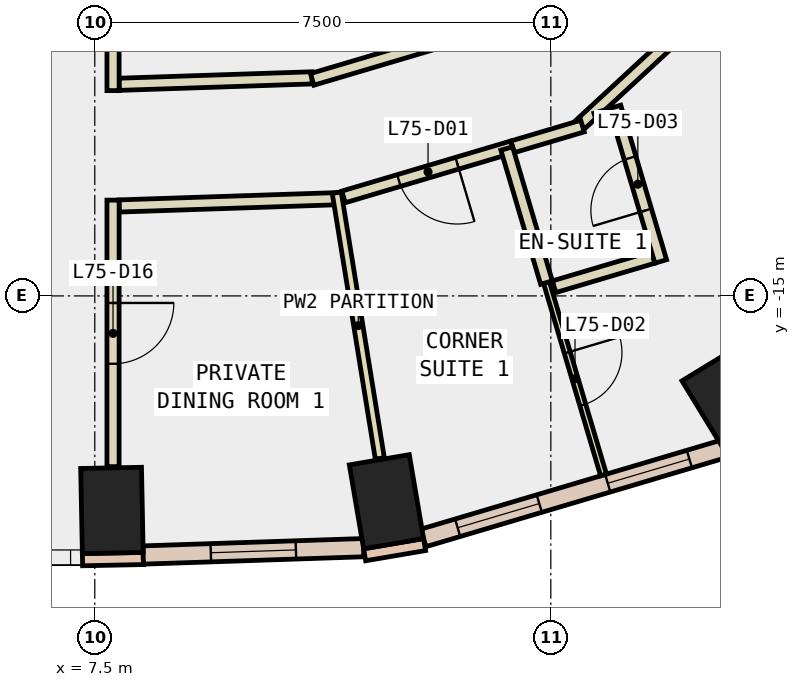
"""IFC4 building model, lengths in metres.
Left out: names, types, materials, properties, quantities, classifications, styles, units other than length and angle.
Written with IfcOpenShell. Run it as: python <this file> out.ifc"""

import sys

from ifc_helpers import new_model, si_unit, direction, frame, frame_2d, origin, origin_2d, place, context, subcontext, project, spatial, rectangle, extrude, element, fill, save


model = new_model("IFC4")
c1 = context("Model", 3, precision=1e-05, world=origin(), true_north=direction((0.0, 1.0)))
c2 = subcontext(c1, "Body", "Model", "MODEL_VIEW")
j1 = project(units=[si_unit("LENGTHUNIT", "METRE"), si_unit("PLANEANGLEUNIT", "RADIAN")], contexts=[c1])
p1 = place(None, origin())
s1 = spatial("IfcSite", under=j1, at=p1, CompositionType="ELEMENT")
p2 = place(p1, origin())
s2 = spatial("IfcBuilding", under=s1, at=p2, CompositionType="ELEMENT")
p3 = place(p2, frame((0.0, 0.0, 318.8)))
s3 = spatial("IfcBuildingStorey", under=s2, at=p3, CompositionType="ELEMENT", Elevation=318.8)
for number, where, z_axis, x_axis in (
    (1, (7.782, -18.528, -0.34), (0.0, 0.0, 1.0), (1.0, 0.02, 0.0)),
    (2, (12.297, -18.385, -0.34), (0.0, 0.0, 1.0), (0.986, 0.168, 0.0)),
    (3, (17.949, -16.734, -0.34), (0.0, 0.0, 1.0), (0.854, 0.521, 0.0)),
):
    element("IfcColumn", number, at=place(p3, frame(where, z_axis=z_axis, x_axis=x_axis)), inside=s3, PredefinedType="COLUMN", context=c2, shape_type="SweptSolid", body=[
        extrude(rectangle(XDim=1.0, YDim=1.4, at=origin_2d()), origin(), (0.0, 0.0, 1.0), 3.6),
    ])
for number, where, z_axis, x_axis in (
    (4, (7.298, -19.338, 0.0), (0.0, 0.0, 1.0), (1.0, 0.02, 0.0)),
    (5, (11.938, -19.257, 0.0), (0.0, 0.0, 1.0), (0.986, 0.168, 0.0)),
):
    element("IfcWall", number, at=place(p3, frame(where, z_axis=z_axis, x_axis=x_axis)), inside=s3, PredefinedType="STANDARD", context=c2, shape_type="SweptSolid", body=[
        extrude(rectangle(XDim=1.0, YDim=0.2, at=frame_2d((0.5, 0.0))), origin(), (0.0, 0.0, 1.0), 3.26),
    ])
p4 = place(p3, frame((8.296, -19.261, 0.0), z_axis=(0.0, 0.0, 1.0), x_axis=(0.999441913039, 0.033404527552, 0.0)))
e6 = element("IfcWall", 6, at=p4, inside=s3, PredefinedType="STANDARD", context=c2, shape_type="SweptSolid", body=[
    extrude(rectangle(XDim=3.625, YDim=0.3, at=frame_2d((1.812, 0.0))), origin(), (0.0, 0.0, 1.0), 3.26),
])
p5 = place(p4, frame((1.113, 0.0, 0.9)))
e7 = element("IfcOpeningElement", 7, at=p5, cuts=e6, PredefinedType="OPENING", context=c2, shape_type="SweptSolid", body=[
    extrude(rectangle(XDim=1.4, YDim=2.0, at=frame_2d((0.7, 1.0))), frame((0.0, 0.16, 0.0), z_axis=(0.0, -1.0, 0.0), x_axis=(1.0, 0.0, 0.0)), (0.0, 0.0, 1.0), 0.32),
])
p6 = place(p3, frame((12.904, -18.98, 0.0), z_axis=(0.0, 0.0, 1.0), x_axis=(0.958757933751, 0.284223898486, 0.0)))
e8 = element("IfcWall", 8, at=p6, inside=s3, PredefinedType="STANDARD", context=c2, shape_type="SweptSolid", body=[
    extrude(rectangle(XDim=5.15, YDim=0.3, at=frame_2d((2.575, 0.0))), origin(), (0.0, 0.0, 1.0), 3.26),
])
p7 = place(p6, frame((0.588, 0.0, 0.9)))
e9 = element("IfcOpeningElement", 9, at=p7, cuts=e8, PredefinedType="OPENING", context=c2, shape_type="SweptSolid", body=[
    extrude(rectangle(XDim=1.4, YDim=2.0, at=frame_2d((0.7, 1.0))), frame((0.0, 0.16, 0.0), z_axis=(0.0, -1.0, 0.0), x_axis=(1.0, 0.0, 0.0)), (0.0, 0.0, 1.0), 0.32),
])
p8 = place(p6, frame((3.163, 0.0, 0.9)))
e10 = element("IfcOpeningElement", 10, at=p8, cuts=e8, PredefinedType="OPENING", context=c2, shape_type="SweptSolid", body=[
    extrude(rectangle(XDim=1.4, YDim=2.0, at=frame_2d((0.7, 1.0))), frame((0.0, 0.16, 0.0), z_axis=(0.0, -1.0, 0.0), x_axis=(1.0, 0.0, 0.0)), (0.0, 0.0, 1.0), 0.32),
])
p9 = place(p3, frame((7.9, -11.52, 0.0), z_axis=(0.0, 0.0, 1.0), x_axis=(0.999442599499, 0.033383982774, 0.0)))
e11 = element("IfcWall", 11, at=p9, inside=s3, PredefinedType="PARTITIONING", context=c2, shape_type="SweptSolid", body=[
    extrude(rectangle(XDim=3.174, YDim=0.2, at=frame_2d((1.587, 0.0))), origin(), (0.0, 0.0, 1.0), 3.26),
])
p10 = place(p3, frame((11.076, -11.439, 0.0), z_axis=(0.0, 0.0, 1.0), x_axis=(0.958760241353, 0.284216114252, 0.0)))
e12 = element("IfcWall", 12, at=p10, inside=s3, PredefinedType="PARTITIONING", context=c2, shape_type="SweptSolid", body=[
    extrude(rectangle(XDim=3.578, YDim=0.2, at=frame_2d((1.789, 0.0))), origin(), (0.0, 0.0, 1.0), 3.26),
])
p11 = place(p3, frame((11.52, -13.4, 0.0), z_axis=(0.0, 0.0, 1.0), x_axis=(-0.999441010134, -0.033431530957, 0.0)))
e13 = element("IfcWall", 13, at=p11, inside=s3, PredefinedType="PARTITIONING", context=c2, shape_type="SweptSolid", body=[
    extrude(rectangle(XDim=3.622, YDim=0.2, at=frame_2d((1.811, 0.0))), origin(), (0.0, 0.0, 1.0), 3.26),
])
p12 = place(p3, frame((14.371, -12.548, 0.0), z_axis=(0.0, 0.0, 1.0), x_axis=(-0.958773475867, -0.284171465799, 0.0)))
e14 = element("IfcWall", 14, at=p12, inside=s3, PredefinedType="PARTITIONING", context=c2, shape_type="SweptSolid", body=[
    extrude(rectangle(XDim=2.9, YDim=0.2, at=frame_2d((1.45, 0.0))), origin(), (0.0, 0.0, 1.0), 3.26),
])
p13 = place(p12, frame((0.95, 0.0, 0.0)))
e15 = element("IfcOpeningElement", 15, at=p13, cuts=e14, PredefinedType="OPENING", context=c2, shape_type="SweptSolid", body=[
    extrude(rectangle(XDim=1.0, YDim=2.1, at=frame_2d((0.5, 1.05))), frame((0.0, 0.11, 0.0), z_axis=(0.0, -1.0, 0.0), x_axis=(1.0, 0.0, 0.0)), (0.0, 0.0, 1.0), 0.22),
])
p14 = place(p3, frame((17.718, -10.119, 0.0), z_axis=(0.0, 0.0, 1.0), x_axis=(-0.734673909713, -0.678420405344, 0.0)))
e16 = element("IfcWall", 16, at=p14, inside=s3, PredefinedType="PARTITIONING", context=c2, shape_type="SweptSolid", body=[
    extrude(rectangle(XDim=3.107, YDim=0.2, at=frame_2d((1.554, 0.0))), origin(), (0.0, 0.0, 1.0), 3.26),
])
p15 = place(p3, frame((15.521, -12.207, 0.0), z_axis=(0.0, 0.0, 1.0), x_axis=(-0.958717989575, -0.2843586054, 0.0)))
e17 = element("IfcWall", 17, at=p15, inside=s3, PredefinedType="PARTITIONING", context=c2, shape_type="SweptSolid", body=[
    extrude(rectangle(XDim=1.199, YDim=0.2, at=frame_2d((0.6, 0.0))), origin(), (0.0, 0.0, 1.0), 3.26),
])
p16 = place(p3, frame((7.8, -5.899, 0.0), z_axis=(0.0, 0.0, 1.0), x_axis=(0.0, -1.0, 0.0)))
e18 = element("IfcWall", 18, at=p16, inside=s3, PredefinedType="PARTITIONING", context=c2, shape_type="SweptSolid", body=[
    extrude(rectangle(XDim=5.725, YDim=0.2, at=frame_2d((2.863, 0.0))), origin(), (0.0, 0.0, 1.0), 3.26),
])
p17 = place(p3, frame((7.8, -13.425, 0.0), z_axis=(0.0, 0.0, 1.0), x_axis=(0.0, -1.0, 0.0)))
e19 = element("IfcWall", 19, at=p17, inside=s3, PredefinedType="PARTITIONING", context=c2, shape_type="SweptSolid", body=[
    extrude(rectangle(XDim=4.383, YDim=0.2, at=frame_2d((2.191, 0.0))), origin(), (0.0, 0.0, 1.0), 3.26),
])
p18 = place(p17, frame((1.691, 0.0, 0.0)))
e20 = element("IfcOpeningElement", 20, at=p18, cuts=e19, PredefinedType="OPENING", context=c2, shape_type="SweptSolid", body=[
    extrude(rectangle(XDim=1.0, YDim=2.1, at=frame_2d((0.5, 1.05))), frame((0.0, 0.11, 0.0), z_axis=(0.0, -1.0, 0.0), x_axis=(1.0, 0.0, 0.0)), (0.0, 0.0, 1.0), 0.22),
])
p19 = place(p3, frame((11.479, -13.302, 0.0), z_axis=(0.0, 0.0, 1.0), x_axis=(0.16010600403, -0.987099826499, 0.0)))
e21 = element("IfcWall", 21, at=p19, inside=s3, PredefinedType="PARTITIONING", context=c2, shape_type="SweptSolid", body=[
    extrude(rectangle(XDim=4.428, YDim=0.15, at=frame_2d((2.214, 0.0))), origin(), (0.0, 0.0, 1.0), 3.26),
])
p20 = place(p3, frame((14.929, -14.781, 0.0), z_axis=(0.0, 0.0, 1.0), x_axis=(0.284224342284, -0.958757802186, 0.0)))
e22 = element("IfcWall", 22, at=p20, inside=s3, PredefinedType="PARTITIONING", context=c2, shape_type="SweptSolid", body=[
    extrude(rectangle(XDim=3.3, YDim=0.1, at=frame_2d((1.65, 0.0))), origin(), (0.0, 0.0, 1.0), 3.26),
])
p21 = place(p20, frame((1.2, 0.0, 0.0)))
e23 = element("IfcOpeningElement", 23, at=p21, cuts=e22, PredefinedType="OPENING", context=c2, shape_type="SweptSolid", body=[
    extrude(rectangle(XDim=0.9, YDim=2.1, at=frame_2d((0.45, 1.05))), frame((0.0, 0.06, 0.0), z_axis=(0.0, -1.0, 0.0), x_axis=(1.0, 0.0, 0.0)), (0.0, 0.0, 1.0), 0.12),
])
p22 = place(p3, frame((14.275, -12.576, 0.0), z_axis=(0.0, 0.0, 1.0), x_axis=(0.284366601045, -0.958715618007, 0.0)))
e24 = element("IfcWall", 24, at=p22, inside=s3, PredefinedType="PARTITIONING", context=c2, shape_type="SweptSolid", body=[
    extrude(rectangle(XDim=2.3, YDim=0.2, at=frame_2d((1.15, 0.0))), origin(), (0.0, 0.0, 1.0), 3.26),
])
p23 = place(p3, frame((15.054, -14.849, 0.0), z_axis=(0.0, 0.0, 1.0), x_axis=(0.958727061754, 0.284328016666, 0.0)))
e25 = element("IfcWall", 25, at=p23, inside=s3, PredefinedType="PARTITIONING", context=c2, shape_type="SweptSolid", body=[
    extrude(rectangle(XDim=1.699, YDim=0.2, at=frame_2d((0.85, 0.0))), origin(), (0.0, 0.0, 1.0), 3.26),
])
p24 = place(p3, frame((16.808, -14.433, 0.0), z_axis=(0.0, 0.0, 1.0), x_axis=(-0.284524220245, 0.958668852156, 0.0)))
e26 = element("IfcWall", 26, at=p24, inside=s3, PredefinedType="PARTITIONING", context=c2, shape_type="SweptSolid", body=[
    extrude(rectangle(XDim=2.651, YDim=0.2, at=frame_2d((1.325, 0.0))), origin(), (0.0, 0.0, 1.0), 3.26),
])
p25 = place(p24, frame((0.875, 0.0, 0.0)))
e27 = element("IfcOpeningElement", 27, at=p25, cuts=e26, PredefinedType="OPENING", context=c2, shape_type="SweptSolid", body=[
    extrude(rectangle(XDim=0.9, YDim=2.1, at=frame_2d((0.45, 1.05))), frame((0.0, 0.11, 0.0), z_axis=(0.0, -1.0, 0.0), x_axis=(1.0, 0.0, 0.0)), (0.0, 0.0, 1.0), 0.22),
])
p26 = place(p3, frame((15.987, -12.017, 0.0), z_axis=(0.0, 0.0, 1.0), x_axis=(-0.958598776535, -0.284760224794, 0.0)))
e28 = element("IfcWall", 28, at=p26, inside=s3, PredefinedType="PARTITIONING", context=c2, shape_type="SweptSolid", body=[
    extrude(rectangle(XDim=0.26, YDim=0.2, at=frame_2d((0.13, 0.0))), origin(), (0.0, 0.0, 1.0), 3.26),
])
p27 = place(p5, origin())
e29 = element("IfcWindow", 29, at=p27, inside=s3, PartitioningType="SINGLE_PANEL", PredefinedType="WINDOW", context=c2, shape_type="SweptSolid", body=[
    extrude(rectangle(XDim=1.4, YDim=2.0, at=frame_2d((0.7, 1.0))), frame((0.0, 0.03, 0.0), z_axis=(0.0, -1.0, 0.0), x_axis=(1.0, 0.0, 0.0)), (0.0, 0.0, 1.0), 0.06),
])
fill(e7, e29)
p28 = place(p7, origin())
e30 = element("IfcWindow", 30, at=p28, inside=s3, PartitioningType="SINGLE_PANEL", PredefinedType="WINDOW", context=c2, shape_type="SweptSolid", body=[
    extrude(rectangle(XDim=1.4, YDim=2.0, at=frame_2d((0.7, 1.0))), frame((0.0, 0.03, 0.0), z_axis=(0.0, -1.0, 0.0), x_axis=(1.0, 0.0, 0.0)), (0.0, 0.0, 1.0), 0.06),
])
fill(e9, e30)
p29 = place(p8, origin())
e31 = element("IfcWindow", 31, at=p29, inside=s3, PartitioningType="SINGLE_PANEL", PredefinedType="WINDOW", context=c2, shape_type="SweptSolid", body=[
    extrude(rectangle(XDim=1.4, YDim=2.0, at=frame_2d((0.7, 1.0))), frame((0.0, 0.03, 0.0), z_axis=(0.0, -1.0, 0.0), x_axis=(1.0, 0.0, 0.0)), (0.0, 0.0, 1.0), 0.06),
])
fill(e10, e31)
p30 = place(p13, origin())
e32 = element("IfcDoor", 32, at=p30, inside=s3, OperationType="SINGLE_SWING_LEFT", PredefinedType="DOOR", context=c2, shape_type="SweptSolid", body=[
    extrude(rectangle(XDim=1.0, YDim=2.1, at=frame_2d((0.5, 1.05))), frame((0.0, 0.025, 0.0), z_axis=(0.0, -1.0, 0.0), x_axis=(1.0, 0.0, 0.0)), (0.0, 0.0, 1.0), 0.05),
])
fill(e15, e32)
p31 = place(p21, origin())
e33 = element("IfcDoor", 33, at=p31, inside=s3, OperationType="SINGLE_SWING_LEFT", PredefinedType="DOOR", context=c2, shape_type="SweptSolid", body=[
    extrude(rectangle(XDim=0.9, YDim=2.1, at=frame_2d((0.45, 1.05))), frame((0.0, 0.025, 0.0), z_axis=(0.0, -1.0, 0.0), x_axis=(1.0, 0.0, 0.0)), (0.0, 0.0, 1.0), 0.05),
])
fill(e23, e33)
p32 = place(p25, origin())
e34 = element("IfcDoor", 34, at=p32, inside=s3, OperationType="SINGLE_SWING_LEFT", PredefinedType="DOOR", context=c2, shape_type="SweptSolid", body=[
    extrude(rectangle(XDim=0.9, YDim=2.1, at=frame_2d((0.45, 1.05))), frame((0.0, 0.025, 0.0), z_axis=(0.0, -1.0, 0.0), x_axis=(1.0, 0.0, 0.0)), (0.0, 0.0, 1.0), 0.05),
])
fill(e27, e34)
p33 = place(p18, origin())
e35 = element("IfcDoor", 35, at=p33, inside=s3, OperationType="SINGLE_SWING_LEFT", PredefinedType="DOOR", context=c2, shape_type="SweptSolid", body=[
    extrude(rectangle(XDim=1.0, YDim=2.1, at=frame_2d((0.5, 1.05))), frame((0.0, 0.025, 0.0), z_axis=(0.0, -1.0, 0.0), x_axis=(1.0, 0.0, 0.0)), (0.0, 0.0, 1.0), 0.05),
])
fill(e20, e35)
save(model, sys.argv[1])
